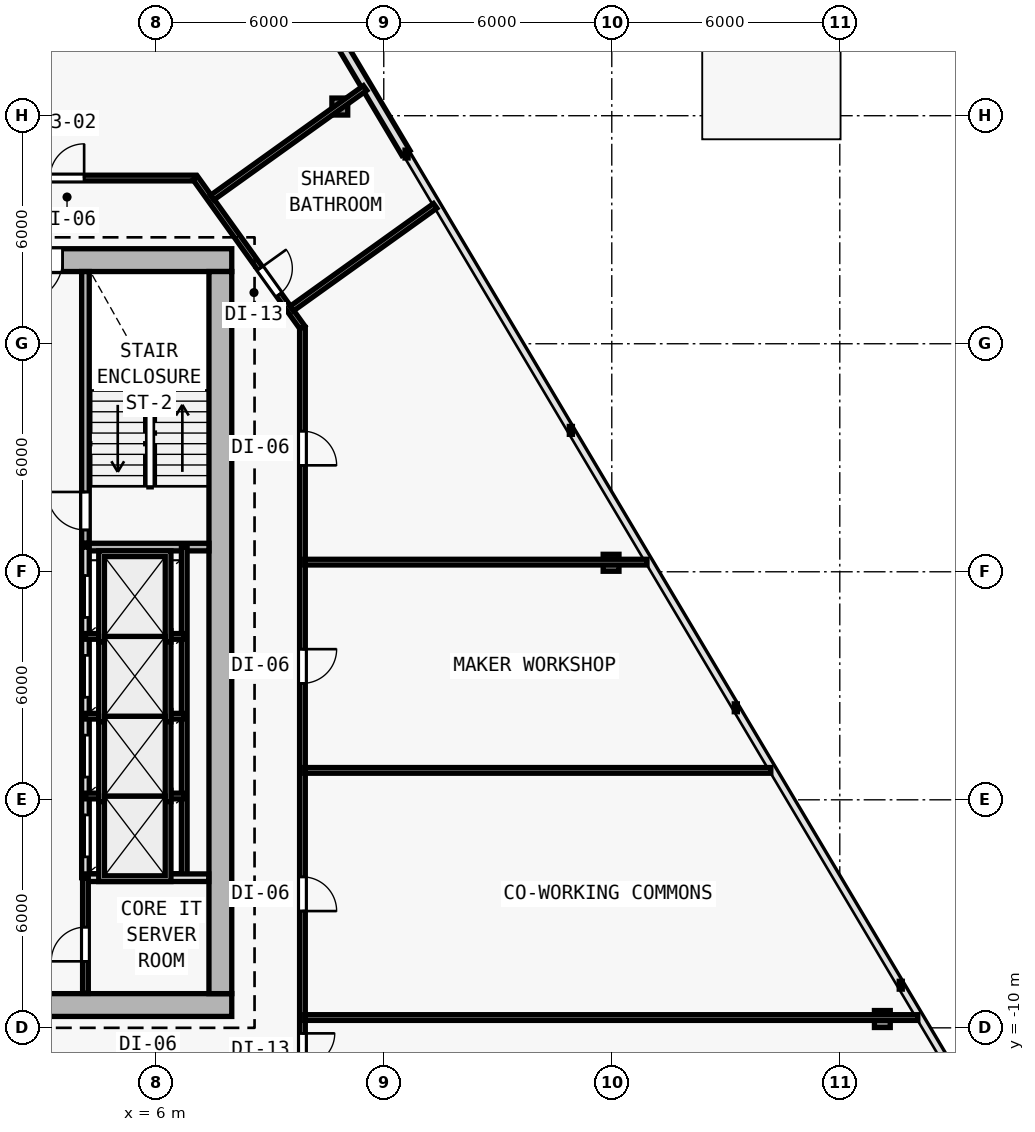
"""IFC4 building model, lengths in metres.
Left out: names, types, materials, properties, quantities, classifications, styles, units other than length and angle.
Written with IfcOpenShell. Run it as: python <this file> out.ifc"""

import sys

from ifc_helpers import new_model, si_unit, direction, frame, frame_2d, origin, origin_2d, place, context, subcontext, project, spatial, rectangle, i_section, extrude, element, fill, save


model = new_model("IFC4")
c1 = context("Model", 3, precision=1e-05, world=origin(), true_north=direction((0.0, 1.0)))
c2 = subcontext(c1, "Body", "Model", "MODEL_VIEW")
j1 = project(units=[si_unit("LENGTHUNIT", "METRE"), si_unit("PLANEANGLEUNIT", "RADIAN")], contexts=[c1])
p1 = place(None, origin())
s1 = spatial("IfcSite", under=j1, at=p1, CompositionType="ELEMENT")
p2 = place(p1, origin())
s2 = spatial("IfcBuilding", under=s1, at=p2, CompositionType="ELEMENT")
p3 = place(p2, frame((0.0, 0.0, 30.0)))
s3 = spatial("IfcBuildingStorey", under=s2, at=p3, CompositionType="ELEMENT", Elevation=30.0)
for number, where, z_axis, x_axis in (
    (1, (7.7, -9.4, 0.0), (0.0, 0.0, 1.0), (1.0, 0.0, 0.0)),
    (2, (7.7, 10.2, 0.0), (0.0, 0.0, 1.0), (1.0, 0.0, 0.0)),
    (3, (7.7, 0.4, 0.0), (0.0, 0.0, 1.0), (1.0, 0.0, 0.0)),
):
    element("IfcColumn", number, at=place(p3, frame(where, z_axis=z_axis, x_axis=x_axis)), inside=s3, PredefinedType="COLUMN", context=c2, shape_type="SweptSolid", body=[
        extrude(i_section(OverallWidth=0.416, OverallDepth=0.446, WebThickness=0.025, FlangeThickness=0.04, FilletRadius=0.015, at=origin_2d()), origin(), (0.0, 0.0, 1.0), 3.6),
    ])
p4 = place(p3, frame((25.12, -9.768, 0.006), z_axis=(-0.026175378493, 0.021620182756, 0.999423542478), x_axis=(-0.636829692742, -0.771004502219, 0.0)))
e4 = element("IfcColumn", 4, at=p4, inside=s3, PredefinedType="COLUMN", context=c2, shape_type="SweptSolid", body=[
    extrude(i_section(OverallWidth=0.416, OverallDepth=0.446, WebThickness=0.025, FlangeThickness=0.04, FilletRadius=0.015, at=origin_2d()), origin(), (0.0, 0.0, 1.0), 3.591),
])
p5 = place(p3, frame((17.982, 2.237, 0.006), z_axis=(-0.01897531407, 0.009521662974, 0.999774612295), x_axis=(-0.44849454954, -0.893785566583, 0.0)))
e5 = element("IfcColumn", 5, at=p5, inside=s3, PredefinedType="COLUMN", context=c2, shape_type="SweptSolid", body=[
    extrude(i_section(OverallWidth=0.416, OverallDepth=0.446, WebThickness=0.025, FlangeThickness=0.04, FilletRadius=0.015, at=origin_2d()), origin(), (0.0, 0.0, 1.0), 3.59),
])
p6 = place(p3, frame((10.844, 14.241, 0.006), z_axis=(-0.011767855299, -0.002516824544, 0.999927588966), x_axis=(0.209143047003, -0.977885057607, 0.0)))
e6 = element("IfcColumn", 6, at=p6, inside=s3, PredefinedType="COLUMN", context=c2, shape_type="SweptSolid", body=[
    extrude(i_section(OverallWidth=0.416, OverallDepth=0.446, WebThickness=0.025, FlangeThickness=0.04, FilletRadius=0.015, at=origin_2d()), origin(), (0.0, 0.0, 1.0), 3.589),
])
p7 = place(p3, frame((6.483, 23.278, 0.0), z_axis=(0.0, 0.0, 1.0), x_axis=(0.511086421046, -0.859529330635, 0.0)))
e7 = element("IfcWall", 7, at=p7, inside=s3, PredefinedType="SOLIDWALL", context=c2, shape_type="SweptSolid", body=[
    extrude(rectangle(XDim=11.935, YDim=0.25, at=frame_2d((5.968, 0.0))), origin(), (0.0, 0.0, 1.0), 3.35),
])
p8 = place(p7, frame((5.218, 0.0, 0.62)))
e8 = element("IfcOpeningElement", 8, at=p8, cuts=e7, PredefinedType="OPENING", context=c2, shape_type="SweptSolid", body=[
    extrude(rectangle(XDim=1.5, YDim=2.0, at=frame_2d((0.75, 1.0))), frame((0.0, 0.135, 0.0), z_axis=(0.0, -1.0, 0.0), x_axis=(1.0, 0.0, 0.0)), (0.0, 0.0, 1.0), 0.27),
])
p9 = place(p3, frame((-8.0, -9.4, 0.0), z_axis=(0.0, 0.0, 1.0), x_axis=(1.0, 0.0, 0.0)))
e9 = element("IfcWall", 9, at=p9, inside=s3, PredefinedType="SHEAR", context=c2, shape_type="SweptSolid", body=[
    extrude(rectangle(XDim=16.0, YDim=0.6, at=frame_2d((8.0, 0.0))), origin(), (0.0, 0.0, 1.0), 3.35),
])
p10 = place(p9, frame((9.65, 0.0, 0.0)))
e10 = element("IfcOpeningElement", 10, at=p10, cuts=e9, PredefinedType="OPENING", context=c2, shape_type="SweptSolid", body=[
    extrude(rectangle(XDim=1.5, YDim=2.2, at=frame_2d((0.75, 1.1))), frame((0.0, 0.31, 0.0), z_axis=(0.0, -1.0, 0.0), x_axis=(1.0, 0.0, 0.0)), (0.0, 0.0, 1.0), 0.62),
])
p11 = place(p3, frame((8.0, 10.2, 0.0), z_axis=(0.0, 0.0, 1.0), x_axis=(-1.0, 0.0, 0.0)))
e11 = element("IfcWall", 11, at=p11, inside=s3, PredefinedType="SHEAR", context=c2, shape_type="SweptSolid", body=[
    extrude(rectangle(XDim=16.0, YDim=0.6, at=frame_2d((8.0, 0.0))), origin(), (0.0, 0.0, 1.0), 3.35),
])
p12 = place(p11, frame((4.45, 0.0, 0.0)))
e12 = element("IfcOpeningElement", 12, at=p12, cuts=e11, PredefinedType="OPENING", context=c2, shape_type="SweptSolid", body=[
    extrude(rectangle(XDim=1.1, YDim=2.15, at=frame_2d((0.55, 1.075))), frame((0.0, 0.31, 0.0), z_axis=(0.0, -1.0, 0.0), x_axis=(1.0, 0.0, 0.0)), (0.0, 0.0, 1.0), 0.62),
])
p13 = place(p3, frame((7.7, 9.9, 0.0), z_axis=(0.0, 0.0, 1.0), x_axis=(0.0, -1.0, 0.0)))
e13 = element("IfcWall", 13, at=p13, inside=s3, PredefinedType="SHEAR", context=c2, shape_type="SweptSolid", body=[
    extrude(rectangle(XDim=19.0, YDim=0.6, at=frame_2d((9.5, 0.0))), origin(), (0.0, 0.0, 1.0), 3.35),
])
p14 = place(p3, frame((4.15, 2.75, 0.0), z_axis=(0.0, 0.0, 1.0), x_axis=(0.0, 1.0, 0.0)))
e14 = element("IfcWall", 14, at=p14, inside=s3, PredefinedType="SOLIDWALL", context=c2, shape_type="SweptSolid", body=[
    extrude(rectangle(XDim=7.15, YDim=0.2, at=frame_2d((3.575, 0.0))), origin(), (0.0, 0.0, 1.0), 3.35),
])
p15 = place(p14, frame((0.35, 0.0, 0.0)))
e15 = element("IfcOpeningElement", 15, at=p15, cuts=e14, PredefinedType="OPENING", context=c2, shape_type="SweptSolid", body=[
    extrude(rectangle(XDim=1.0, YDim=2.15, at=frame_2d((0.5, 1.075))), frame((0.0, 0.11, 0.0), z_axis=(0.0, -1.0, 0.0), x_axis=(1.0, 0.0, 0.0)), (0.0, 0.0, 1.0), 0.22),
])
p16 = place(p3, frame((4.05, 2.65, 0.0), z_axis=(0.0, 0.0, 1.0), x_axis=(1.0, 0.0, 0.0)))
e16 = element("IfcWall", 16, at=p16, inside=s3, PredefinedType="SOLIDWALL", context=c2, shape_type="SweptSolid", body=[
    extrude(rectangle(XDim=3.35, YDim=0.2, at=frame_2d((1.675, 0.0))), origin(), (0.0, 0.0, 1.0), 3.35),
])
p17 = place(p3, frame((4.15, -6.05, 0.0), z_axis=(0.0, 0.0, 1.0), x_axis=(0.0, 1.0, 0.0)))
e17 = element("IfcWall", 17, at=p17, inside=s3, PredefinedType="SOLIDWALL", context=c2, shape_type="SweptSolid", body=[
    extrude(rectangle(XDim=8.7, YDim=0.2, at=frame_2d((4.35, 0.0))), origin(), (0.0, 0.0, 1.0), 3.35),
])
p18 = place(p17, frame((0.55, 0.0, 0.0)))
e18 = element("IfcOpeningElement", 18, at=p18, cuts=e17, PredefinedType="OPENING", context=c2, shape_type="SweptSolid", body=[
    extrude(rectangle(XDim=1.1, YDim=2.15, at=frame_2d((0.55, 1.075))), frame((0.0, 0.11, 0.0), z_axis=(0.0, -1.0, 0.0), x_axis=(1.0, 0.0, 0.0)), (0.0, 0.0, 1.0), 0.22),
])
p19 = place(p17, frame((2.65, 0.0, 0.0)))
e19 = element("IfcOpeningElement", 19, at=p19, cuts=e17, PredefinedType="OPENING", context=c2, shape_type="SweptSolid", body=[
    extrude(rectangle(XDim=1.1, YDim=2.15, at=frame_2d((0.55, 1.075))), frame((0.0, 0.11, 0.0), z_axis=(0.0, -1.0, 0.0), x_axis=(1.0, 0.0, 0.0)), (0.0, 0.0, 1.0), 0.22),
])
p20 = place(p17, frame((4.75, 0.0, 0.0)))
e20 = element("IfcOpeningElement", 20, at=p20, cuts=e17, PredefinedType="OPENING", context=c2, shape_type="SweptSolid", body=[
    extrude(rectangle(XDim=1.1, YDim=2.15, at=frame_2d((0.55, 1.075))), frame((0.0, 0.11, 0.0), z_axis=(0.0, -1.0, 0.0), x_axis=(1.0, 0.0, 0.0)), (0.0, 0.0, 1.0), 0.22),
])
p21 = place(p17, frame((6.85, 0.0, 0.0)))
e21 = element("IfcOpeningElement", 21, at=p21, cuts=e17, PredefinedType="OPENING", context=c2, shape_type="SweptSolid", body=[
    extrude(rectangle(XDim=1.1, YDim=2.15, at=frame_2d((0.55, 1.075))), frame((0.0, 0.11, 0.0), z_axis=(0.0, -1.0, 0.0), x_axis=(1.0, 0.0, 0.0)), (0.0, 0.0, 1.0), 0.22),
])
p22 = place(p3, frame((6.75, -6.05, 0.0), z_axis=(0.0, 0.0, 1.0), x_axis=(0.0, 1.0, 0.0)))
e22 = element("IfcWall", 22, at=p22, inside=s3, PredefinedType="PARTITIONING", context=c2, shape_type="SweptSolid", body=[
    extrude(rectangle(XDim=8.7, YDim=0.15, at=frame_2d((4.35, 0.0))), origin(), (0.0, 0.0, 1.0), 3.35),
])
for number, where, z_axis, x_axis in (
    (23, (4.15, -3.9, 0.0), (0.0, 0.0, 1.0), (1.0, 0.0, 0.0)),
    (24, (4.15, -1.8, 0.0), (0.0, 0.0, 1.0), (1.0, 0.0, 0.0)),
    (25, (4.15, 0.3, 0.0), (0.0, 0.0, 1.0), (1.0, 0.0, 0.0)),
):
    element("IfcWall", number, at=place(p3, frame(where, z_axis=z_axis, x_axis=x_axis)), inside=s3, PredefinedType="PARTITIONING", context=c2, shape_type="SweptSolid", body=[
        extrude(rectangle(XDim=2.6, YDim=0.15, at=frame_2d((1.3, 0.0))), origin(), (0.0, 0.0, 1.0), 3.35),
    ])
p23 = place(p3, frame((4.15, -6.05, 0.0), z_axis=(0.0, 0.0, 1.0), x_axis=(1.0, 0.0, 0.0)))
e26 = element("IfcWall", 26, at=p23, inside=s3, PredefinedType="SOLIDWALL", context=c2, shape_type="SweptSolid", body=[
    extrude(rectangle(XDim=3.245, YDim=0.2, at=frame_2d((1.623, 0.0))), origin(), (0.0, 0.0, 1.0), 3.35),
])
p24 = place(p3, frame((4.15, -9.095, 0.0), z_axis=(0.0, 0.0, 1.0), x_axis=(0.0, 1.0, 0.0)))
e27 = element("IfcWall", 27, at=p24, inside=s3, PredefinedType="PARTITIONING", context=c2, shape_type="SweptSolid", body=[
    extrude(rectangle(XDim=3.045, YDim=0.15, at=frame_2d((1.522, 0.0))), origin(), (0.0, 0.0, 1.0), 3.35),
])
p25 = place(p24, frame((0.845, 0.0, 0.0)))
e28 = element("IfcOpeningElement", 28, at=p25, cuts=e27, PredefinedType="OPENING", context=c2, shape_type="SweptSolid", body=[
    extrude(rectangle(XDim=0.9, YDim=2.1, at=frame_2d((0.45, 1.05))), frame((0.0, 0.085, 0.0), z_axis=(0.0, -1.0, 0.0), x_axis=(1.0, 0.0, 0.0)), (0.0, 0.0, 1.0), 0.17),
])
p26 = place(p3, frame((-7.041, 12.36, 0.0), z_axis=(0.0, 0.0, 1.0), x_axis=(1.0, 0.0, 0.0)))
e29 = element("IfcWall", 29, at=p26, inside=s3, PredefinedType="PARTITIONING", context=c2, shape_type="SweptSolid", body=[
    extrude(rectangle(XDim=14.082, YDim=0.15, at=frame_2d((7.041, 0.0))), origin(), (0.0, 0.0, 1.0), 3.35),
])
p27 = place(p26, frame((10.257, 0.0, 0.0)))
e30 = element("IfcOpeningElement", 30, at=p27, cuts=e29, PredefinedType="OPENING", context=c2, shape_type="SweptSolid", body=[
    extrude(rectangle(XDim=0.9, YDim=2.1, at=frame_2d((0.45, 1.05))), frame((0.0, 0.085, 0.0), z_axis=(0.0, -1.0, 0.0), x_axis=(1.0, 0.0, 0.0)), (0.0, 0.0, 1.0), 0.17),
])
p28 = place(p26, frame((3.394, 0.0, 0.0)))
e31 = element("IfcOpeningElement", 31, at=p28, cuts=e29, PredefinedType="OPENING", context=c2, shape_type="SweptSolid", body=[
    extrude(rectangle(XDim=0.9, YDim=2.1, at=frame_2d((0.45, 1.05))), frame((0.0, 0.085, 0.0), z_axis=(0.0, -1.0, 0.0), x_axis=(1.0, 0.0, 0.0)), (0.0, 0.0, 1.0), 0.17),
])
p29 = place(p3, frame((7.041, 12.36, 0.0), z_axis=(0.0, 0.0, 1.0), x_axis=(0.582449511476, -0.812866881218, 0.0)))
e32 = element("IfcWall", 32, at=p29, inside=s3, PredefinedType="PARTITIONING", context=c2, shape_type="SweptSolid", body=[
    extrude(rectangle(XDim=4.84, YDim=0.15, at=frame_2d((2.42, 0.0))), origin(), (0.0, 0.0, 1.0), 2.725),
])
p30 = place(p29, frame((2.924, 0.0, 0.0)))
e33 = element("IfcOpeningElement", 33, at=p30, cuts=e32, PredefinedType="OPENING", context=c2, shape_type="SweptSolid", body=[
    extrude(rectangle(XDim=0.85, YDim=2.1, at=frame_2d((0.425, 1.05))), frame((0.0, 0.085, 0.0), z_axis=(0.0, -1.0, 0.0), x_axis=(1.0, 0.0, 0.0)), (0.0, 0.0, 1.0), 0.17),
])
p31 = place(p3, frame((9.86, 8.426, 0.0), z_axis=(0.0, 0.0, 1.0), x_axis=(0.0, -1.0, 0.0)))
e34 = element("IfcWall", 34, at=p31, inside=s3, PredefinedType="PARTITIONING", context=c2, shape_type="SweptSolid", body=[
    extrude(rectangle(XDim=19.986, YDim=0.15, at=frame_2d((9.993, 0.0))), origin(), (0.0, 0.0, 1.0), 2.609),
])
p32 = place(p31, frame((18.571, 0.0, 0.0)))
e35 = element("IfcOpeningElement", 35, at=p32, cuts=e34, PredefinedType="OPENING", context=c2, shape_type="SweptSolid", body=[
    extrude(rectangle(XDim=0.85, YDim=2.1, at=frame_2d((0.425, 1.05))), frame((0.0, 0.085, 0.0), z_axis=(0.0, -1.0, 0.0), x_axis=(1.0, 0.0, 0.0)), (0.0, 0.0, 1.0), 0.17),
])
p33 = place(p31, frame((14.453, 0.0, 0.0)))
e36 = element("IfcOpeningElement", 36, at=p33, cuts=e34, PredefinedType="OPENING", context=c2, shape_type="SweptSolid", body=[
    extrude(rectangle(XDim=0.9, YDim=2.1, at=frame_2d((0.45, 1.05))), frame((0.0, 0.085, 0.0), z_axis=(0.0, -1.0, 0.0), x_axis=(1.0, 0.0, 0.0)), (0.0, 0.0, 1.0), 0.17),
])
p34 = place(p31, frame((8.462, 0.0, 0.0)))
e37 = element("IfcOpeningElement", 37, at=p34, cuts=e34, PredefinedType="OPENING", context=c2, shape_type="SweptSolid", body=[
    extrude(rectangle(XDim=0.9, YDim=2.1, at=frame_2d((0.45, 1.05))), frame((0.0, 0.085, 0.0), z_axis=(0.0, -1.0, 0.0), x_axis=(1.0, 0.0, 0.0)), (0.0, 0.0, 1.0), 0.17),
])
p35 = place(p31, frame((2.725, 0.0, 0.0)))
e38 = element("IfcOpeningElement", 38, at=p35, cuts=e34, PredefinedType="OPENING", context=c2, shape_type="SweptSolid", body=[
    extrude(rectangle(XDim=0.9, YDim=2.1, at=frame_2d((0.45, 1.05))), frame((0.0, 0.085, 0.0), z_axis=(0.0, -1.0, 0.0), x_axis=(1.0, 0.0, 0.0)), (0.0, 0.0, 1.0), 0.17),
])
p36 = place(p3, frame((9.92, -9.729, 0.0), z_axis=(0.0, 0.0, 1.0), x_axis=(1.0, 0.0, 0.0)))
e39 = element("IfcWall", 39, at=p36, inside=s3, PredefinedType="PARTITIONING", context=c2, shape_type="SweptSolid", body=[
    extrude(rectangle(XDim=16.132, YDim=0.15, at=frame_2d((8.066, 0.0))), origin(), (0.0, 0.0, 1.0), 2.609),
])
p37 = place(p3, frame((9.92, 2.254, 0.0), z_axis=(0.0, 0.0, 1.0), x_axis=(1.0, 0.0, 0.0)))
e40 = element("IfcWall", 40, at=p37, inside=s3, PredefinedType="PARTITIONING", context=c2, shape_type="SweptSolid", body=[
    extrude(rectangle(XDim=9.007, YDim=0.15, at=frame_2d((4.503, 0.0))), origin(), (0.0, 0.0, 1.0), 2.735),
])
p38 = place(p3, frame((7.484, 11.845, 0.0), z_axis=(0.0, 0.0, 1.0), x_axis=(0.812893001267, 0.582413056594, 0.0)))
e41 = element("IfcWall", 41, at=p38, inside=s3, PredefinedType="PARTITIONING", context=c2, shape_type="SweptSolid", body=[
    extrude(rectangle(XDim=4.951, YDim=0.15, at=frame_2d((2.476, 0.0))), origin(), (0.0, 0.0, 1.0), 2.725),
])
p39 = place(p3, frame((9.92, -3.226, 0.0), z_axis=(0.0, 0.0, 1.0), x_axis=(1.0, 0.0, 0.0)))
e42 = element("IfcWall", 42, at=p39, inside=s3, PredefinedType="PARTITIONING", context=c2, shape_type="SweptSolid", body=[
    extrude(rectangle(XDim=12.265, YDim=0.15, at=frame_2d((6.132, 0.0))), origin(), (0.0, 0.0, 1.0), 2.735),
])
p40 = place(p3, frame((9.577, 8.923, 0.0), z_axis=(0.0, 0.0, 1.0), x_axis=(0.812869397286, 0.582446000034, 0.0)))
e43 = element("IfcWall", 43, at=p40, inside=s3, PredefinedType="PARTITIONING", context=c2, shape_type="SweptSolid", body=[
    extrude(rectangle(XDim=4.644, YDim=0.15, at=frame_2d((2.322, 0.0))), origin(), (0.0, 0.0, 1.0), 2.735),
])
p41 = place(p12, origin())
e44 = element("IfcDoor", 44, at=p41, inside=s3, OperationType="SINGLE_SWING_RIGHT", PredefinedType="DOOR", context=c2, shape_type="SweptSolid", body=[
    extrude(rectangle(XDim=1.1, YDim=2.15, at=frame_2d((0.55, 1.075))), frame((0.0, 0.025, 0.0), z_axis=(0.0, -1.0, 0.0), x_axis=(1.0, 0.0, 0.0)), (0.0, 0.0, 1.0), 0.05),
])
fill(e12, e44)
p42 = place(p15, origin())
e45 = element("IfcDoor", 45, at=p42, inside=s3, OperationType="SINGLE_SWING_RIGHT", PredefinedType="DOOR", context=c2, shape_type="SweptSolid", body=[
    extrude(rectangle(XDim=1.0, YDim=2.15, at=frame_2d((0.5, 1.075))), frame((0.0, 0.025, 0.0), z_axis=(0.0, -1.0, 0.0), x_axis=(1.0, 0.0, 0.0)), (0.0, 0.0, 1.0), 0.05),
])
fill(e15, e45)
p43 = place(p18, origin())
e46 = element("IfcDoor", 46, at=p43, inside=s3, OperationType="DOUBLE_DOOR_SLIDING", PredefinedType="DOOR", context=c2, shape_type="SweptSolid", body=[
    extrude(rectangle(XDim=1.1, YDim=2.15, at=frame_2d((0.55, 1.075))), frame((0.0, 0.025, 0.0), z_axis=(0.0, -1.0, 0.0), x_axis=(1.0, 0.0, 0.0)), (0.0, 0.0, 1.0), 0.05),
])
fill(e18, e46)
p44 = place(p19, origin())
e47 = element("IfcDoor", 47, at=p44, inside=s3, OperationType="DOUBLE_DOOR_SLIDING", PredefinedType="DOOR", context=c2, shape_type="SweptSolid", body=[
    extrude(rectangle(XDim=1.1, YDim=2.15, at=frame_2d((0.55, 1.075))), frame((0.0, 0.025, 0.0), z_axis=(0.0, -1.0, 0.0), x_axis=(1.0, 0.0, 0.0)), (0.0, 0.0, 1.0), 0.05),
])
fill(e19, e47)
p45 = place(p20, origin())
e48 = element("IfcDoor", 48, at=p45, inside=s3, OperationType="DOUBLE_DOOR_SLIDING", PredefinedType="DOOR", context=c2, shape_type="SweptSolid", body=[
    extrude(rectangle(XDim=1.1, YDim=2.15, at=frame_2d((0.55, 1.075))), frame((0.0, 0.025, 0.0), z_axis=(0.0, -1.0, 0.0), x_axis=(1.0, 0.0, 0.0)), (0.0, 0.0, 1.0), 0.05),
])
fill(e20, e48)
p46 = place(p21, origin())
e49 = element("IfcDoor", 49, at=p46, inside=s3, OperationType="DOUBLE_DOOR_SLIDING", PredefinedType="DOOR", context=c2, shape_type="SweptSolid", body=[
    extrude(rectangle(XDim=1.1, YDim=2.15, at=frame_2d((0.55, 1.075))), frame((0.0, 0.025, 0.0), z_axis=(0.0, -1.0, 0.0), x_axis=(1.0, 0.0, 0.0)), (0.0, 0.0, 1.0), 0.05),
])
fill(e21, e49)
p47 = place(p25, origin())
e50 = element("IfcDoor", 50, at=p47, inside=s3, OperationType="SINGLE_SWING_LEFT", PredefinedType="DOOR", context=c2, shape_type="SweptSolid", body=[
    extrude(rectangle(XDim=0.9, YDim=2.1, at=frame_2d((0.45, 1.05))), frame((0.0, 0.025, 0.0), z_axis=(0.0, -1.0, 0.0), x_axis=(1.0, 0.0, 0.0)), (0.0, 0.0, 1.0), 0.05),
])
fill(e28, e50)
p48 = place(p32, origin())
e51 = element("IfcDoor", 51, at=p48, inside=s3, OperationType="SINGLE_SWING_LEFT", PredefinedType="DOOR", context=c2, shape_type="SweptSolid", body=[
    extrude(rectangle(XDim=0.85, YDim=2.1, at=frame_2d((0.425, 1.05))), frame((0.0, 0.025, 0.0), z_axis=(0.0, -1.0, 0.0), x_axis=(1.0, 0.0, 0.0)), (0.0, 0.0, 1.0), 0.05),
])
fill(e35, e51)
p49 = place(p33, origin())
e52 = element("IfcDoor", 52, at=p49, inside=s3, OperationType="SINGLE_SWING_RIGHT", PredefinedType="DOOR", context=c2, shape_type="SweptSolid", body=[
    extrude(rectangle(XDim=0.9, YDim=2.1, at=frame_2d((0.45, 1.05))), frame((0.0, 0.025, 0.0), z_axis=(0.0, -1.0, 0.0), x_axis=(1.0, 0.0, 0.0)), (0.0, 0.0, 1.0), 0.05),
])
fill(e36, e52)
p50 = place(p34, origin())
e53 = element("IfcDoor", 53, at=p50, inside=s3, OperationType="SINGLE_SWING_LEFT", PredefinedType="DOOR", context=c2, shape_type="SweptSolid", body=[
    extrude(rectangle(XDim=0.9, YDim=2.1, at=frame_2d((0.45, 1.05))), frame((0.0, 0.025, 0.0), z_axis=(0.0, -1.0, 0.0), x_axis=(1.0, 0.0, 0.0)), (0.0, 0.0, 1.0), 0.05),
])
fill(e37, e53)
p51 = place(p35, origin())
e54 = element("IfcDoor", 54, at=p51, inside=s3, OperationType="SINGLE_SWING_RIGHT", PredefinedType="DOOR", context=c2, shape_type="SweptSolid", body=[
    extrude(rectangle(XDim=0.9, YDim=2.1, at=frame_2d((0.45, 1.05))), frame((0.0, 0.025, 0.0), z_axis=(0.0, -1.0, 0.0), x_axis=(1.0, 0.0, 0.0)), (0.0, 0.0, 1.0), 0.05),
])
fill(e38, e54)
p52 = place(p30, origin())
e55 = element("IfcDoor", 55, at=p52, inside=s3, OperationType="SINGLE_SWING_LEFT", PredefinedType="DOOR", context=c2, shape_type="SweptSolid", body=[
    extrude(rectangle(XDim=0.85, YDim=2.1, at=frame_2d((0.425, 1.05))), frame((0.0, 0.025, 0.0), z_axis=(0.0, -1.0, 0.0), x_axis=(1.0, 0.0, 0.0)), (0.0, 0.0, 1.0), 0.05),
])
fill(e33, e55)
p53 = place(p27, origin())
e56 = element("IfcDoor", 56, at=p53, inside=s3, OperationType="SINGLE_SWING_RIGHT", PredefinedType="DOOR", context=c2, shape_type="SweptSolid", body=[
    extrude(rectangle(XDim=0.9, YDim=2.1, at=frame_2d((0.45, 1.05))), frame((0.0, 0.025, 0.0), z_axis=(0.0, -1.0, 0.0), x_axis=(1.0, 0.0, 0.0)), (0.0, 0.0, 1.0), 0.05),
])
fill(e30, e56)
save(model, sys.argv[1])
